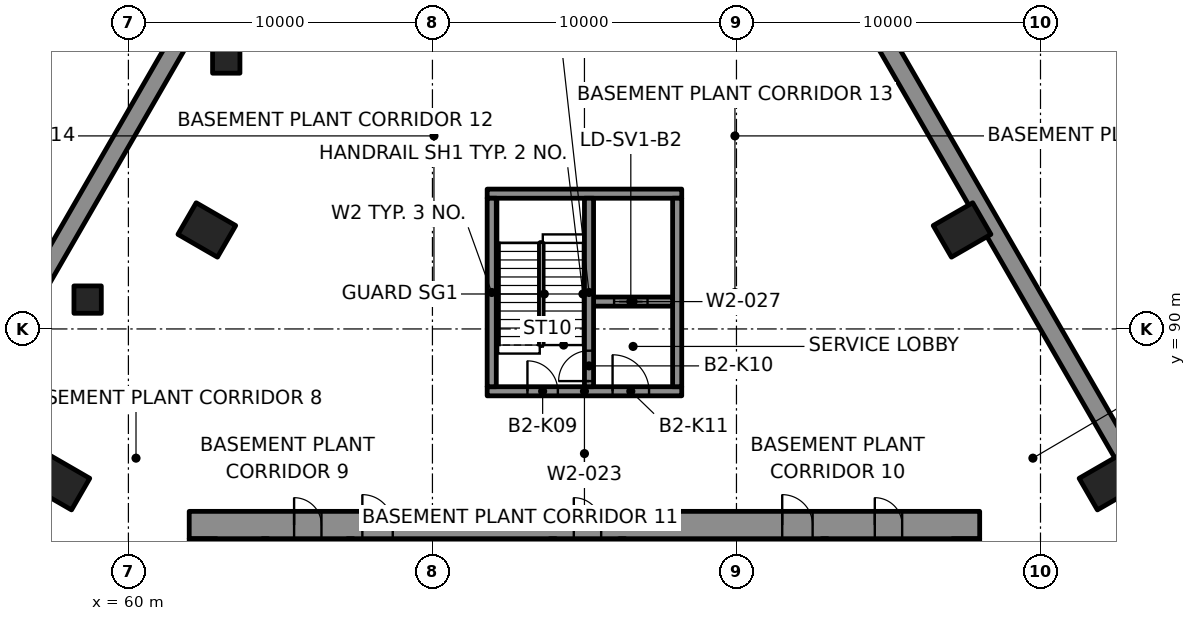
"""IFC4 building model, lengths in metres.
Left out: names, types, materials, properties, quantities, classifications, styles, units other than length and angle.
Written with IfcOpenShell. Run it as: python <this file> out.ifc"""

import sys

from ifc_helpers import new_model, si_unit, direction, frame, frame_2d, origin, origin_2d, place, context, subcontext, project, spatial, rectangle, extrude, element, fill, save


model = new_model("IFC4")
c1 = context("Model", 3, precision=1e-05, world=origin(), true_north=direction((0.0, 1.0)))
c2 = subcontext(c1, "Body", "Model", "MODEL_VIEW")
j1 = project(units=[si_unit("LENGTHUNIT", "METRE"), si_unit("PLANEANGLEUNIT", "RADIAN")], contexts=[c1])
p1 = place(None, origin())
s1 = spatial("IfcSite", under=j1, at=p1, CompositionType="ELEMENT")
p2 = place(p1, origin())
s2 = spatial("IfcBuilding", under=s1, at=p2, CompositionType="ELEMENT")
p3 = place(p2, frame((0.0, 0.0, -9.5)))
s3 = spatial("IfcBuildingStorey", under=s2, at=p3, CompositionType="ELEMENT", Elevation=-9.5)
p4 = place(p3, frame((109.132, 57.451, -0.35), z_axis=(0.0, 0.0, 1.0), x_axis=(-0.499999206999, 0.866025861623, 0.0)))
e1 = element("IfcWall", 1, at=p4, inside=s3, PredefinedType="SOLIDWALL", context=c2, shape_type="SweptSolid", body=[
    extrude(rectangle(XDim=61.064, YDim=0.6, at=frame_2d((30.532, 0.0))), origin(), (0.0, 0.0, 1.0), 4.5),
])
p5 = place(p3, frame((67.936, 110.334, -0.35), z_axis=(0.0, 0.0, 1.0), x_axis=(-0.499999089162, -0.866025929656, 0.0)))
e2 = element("IfcWall", 2, at=p5, inside=s3, PredefinedType="SOLIDWALL", context=c2, shape_type="SweptSolid", body=[
    extrude(rectangle(XDim=53.501, YDim=0.6, at=frame_2d((26.751, 0.0))), origin(), (0.0, 0.0, 1.0), 4.5),
])
for number, where, z_axis, x_axis in (
    (3, (92.22, 84.942, 0.0), (0.0, 0.0, 1.0), (-0.5, 0.866, 0.0)),
    (4, (87.421, 93.256, 0.0), (0.0, 0.0, 1.0), (-0.5, 0.866, 0.0)),
    (5, (62.579, 93.256, 0.0), (0.0, 0.0, 1.0), (-0.5, -0.866, 0.0)),
    (6, (57.78, 84.942, 0.0), (0.0, 0.0, 1.0), (-0.5, -0.866, 0.0)),
):
    element("IfcColumn", number, at=place(p3, frame(where, z_axis=z_axis, x_axis=x_axis)), inside=s3, PredefinedType="COLUMN", context=c2, shape_type="SweptSolid", body=[
        extrude(rectangle(XDim=1.2, YDim=1.5, at=origin_2d()), origin(), (0.0, 0.0, 1.0), 4.5),
    ])
for number, where, z_axis, x_axis in (
    (7, (58.659, 90.966, 0.0), (0.0, 0.0, 1.0), (1.0, 0.0, 0.0)),
    (8, (63.219, 98.863, 0.0), (0.0, 0.0, 1.0), (1.0, 0.0, 0.0)),
):
    element("IfcColumn", number, at=place(p3, frame(where, z_axis=z_axis, x_axis=x_axis)), inside=s3, PredefinedType="COLUMN", context=c2, shape_type="SweptSolid", body=[
        extrude(rectangle(XDim=0.9, YDim=0.9, at=origin_2d()), origin(), (0.0, 0.0, 1.0), 4.5),
    ])
p6 = place(p3, frame((62.0, 83.55, 0.0), z_axis=(0.0, 0.0, 1.0), x_axis=(1.0, 0.0, 0.0)))
e9 = element("IfcWall", 9, at=p6, inside=s3, PredefinedType="SHEAR", context=c2, shape_type="SweptSolid", body=[
    extrude(rectangle(XDim=26.0, YDim=0.9, at=frame_2d((13.0, 0.0))), origin(), (0.0, 0.0, 1.0), 4.15),
])
p7 = place(p6, frame((5.695, 0.0, 0.0)))
e10 = element("IfcOpeningElement", 10, at=p7, cuts=e9, PredefinedType="OPENING", context=c2, shape_type="SweptSolid", body=[
    extrude(rectangle(XDim=1.0, YDim=2.1, at=frame_2d((0.5, 1.05))), frame((0.0, 0.46, 0.0), z_axis=(0.0, -1.0, 0.0), x_axis=(1.0, 0.0, 0.0)), (0.0, 0.0, 1.0), 0.92),
])
p8 = place(p6, frame((19.505, 0.0, 0.0)))
e11 = element("IfcOpeningElement", 11, at=p8, cuts=e9, PredefinedType="OPENING", context=c2, shape_type="SweptSolid", body=[
    extrude(rectangle(XDim=1.0, YDim=2.1, at=frame_2d((0.5, 1.05))), frame((0.0, 0.46, 0.0), z_axis=(0.0, -1.0, 0.0), x_axis=(1.0, 0.0, 0.0)), (0.0, 0.0, 1.0), 0.92),
])
p9 = place(p6, frame((3.45, 0.0, 0.0)))
e12 = element("IfcOpeningElement", 12, at=p9, cuts=e9, PredefinedType="OPENING", context=c2, shape_type="SweptSolid", body=[
    extrude(rectangle(XDim=0.9, YDim=2.1, at=frame_2d((0.45, 1.05))), frame((0.0, 0.46, 0.0), z_axis=(0.0, -1.0, 0.0), x_axis=(1.0, 0.0, 0.0)), (0.0, 0.0, 1.0), 0.92),
])
p10 = place(p6, frame((12.65, 0.0, 0.0)))
e13 = element("IfcOpeningElement", 13, at=p10, cuts=e9, PredefinedType="OPENING", context=c2, shape_type="SweptSolid", body=[
    extrude(rectangle(XDim=0.9, YDim=2.1, at=frame_2d((0.45, 1.05))), frame((0.0, 0.46, 0.0), z_axis=(0.0, -1.0, 0.0), x_axis=(1.0, 0.0, 0.0)), (0.0, 0.0, 1.0), 0.92),
])
p11 = place(p6, frame((22.55, 0.0, 0.0)))
e14 = element("IfcOpeningElement", 14, at=p11, cuts=e9, PredefinedType="OPENING", context=c2, shape_type="SweptSolid", body=[
    extrude(rectangle(XDim=0.9, YDim=2.1, at=frame_2d((0.45, 1.05))), frame((0.0, 0.46, 0.0), z_axis=(0.0, -1.0, 0.0), x_axis=(1.0, 0.0, 0.0)), (0.0, 0.0, 1.0), 0.92),
])
p12 = place(p3, frame((62.45, 66.9, 0.0), z_axis=(0.0, 0.0, 1.0), x_axis=(0.0, 1.0, 0.0)))
e15 = element("IfcWall", 15, at=p12, inside=s3, PredefinedType="SHEAR", context=c2, shape_type="SweptSolid", body=[
    extrude(rectangle(XDim=16.2, YDim=0.9, at=frame_2d((8.1, 0.0))), origin(), (0.0, 0.0, 1.0), 4.15),
])
p13 = place(p12, frame((5.5, 0.0, 0.0)))
e16 = element("IfcOpeningElement", 16, at=p13, cuts=e15, PredefinedType="OPENING", context=c2, shape_type="SweptSolid", body=[
    extrude(rectangle(XDim=1.8, YDim=2.1, at=frame_2d((0.9, 1.05))), frame((0.0, 0.46, 0.0), z_axis=(0.0, -1.0, 0.0), x_axis=(1.0, 0.0, 0.0)), (0.0, 0.0, 1.0), 0.92),
])
p14 = place(p3, frame((87.55, 66.9, 0.0), z_axis=(0.0, 0.0, 1.0), x_axis=(0.0, 1.0, 0.0)))
e17 = element("IfcWall", 17, at=p14, inside=s3, PredefinedType="SHEAR", context=c2, shape_type="SweptSolid", body=[
    extrude(rectangle(XDim=16.2, YDim=0.9, at=frame_2d((8.1, 0.0))), origin(), (0.0, 0.0, 1.0), 4.15),
])
p15 = place(p14, frame((5.5, 0.0, 0.0)))
e18 = element("IfcOpeningElement", 18, at=p15, cuts=e17, PredefinedType="OPENING", context=c2, shape_type="SweptSolid", body=[
    extrude(rectangle(XDim=1.8, YDim=2.1, at=frame_2d((0.9, 1.05))), frame((0.0, 0.46, 0.0), z_axis=(0.0, -1.0, 0.0), x_axis=(1.0, 0.0, 0.0)), (0.0, 0.0, 1.0), 0.92),
])
p16 = place(p14, frame((11.202, 0.0, 0.0)))
e19 = element("IfcOpeningElement", 19, at=p16, cuts=e17, PredefinedType="OPENING", context=c2, shape_type="SweptSolid", body=[
    extrude(rectangle(XDim=0.9, YDim=2.1, at=frame_2d((0.45, 1.05))), frame((0.0, 0.46, 0.0), z_axis=(0.0, -1.0, 0.0), x_axis=(1.0, 0.0, 0.0)), (0.0, 0.0, 1.0), 0.92),
])
p17 = place(p3, frame((71.8, 87.95, 0.0), z_axis=(0.0, 0.0, 1.0), x_axis=(1.0, 0.0, 0.0)))
e20 = element("IfcWall", 20, at=p17, inside=s3, PredefinedType="SHEAR", context=c2, shape_type="SweptSolid", body=[
    extrude(rectangle(XDim=6.4, YDim=0.3, at=frame_2d((3.2, 0.0))), origin(), (0.0, 0.0, 1.0), 4.15),
])
p18 = place(p17, frame((1.325, 0.0, 0.0)))
e21 = element("IfcOpeningElement", 21, at=p18, cuts=e20, PredefinedType="OPENING", context=c2, shape_type="SweptSolid", body=[
    extrude(rectangle(XDim=1.0, YDim=2.1, at=frame_2d((0.5, 1.05))), frame((0.0, 0.16, 0.0), z_axis=(0.0, -1.0, 0.0), x_axis=(1.0, 0.0, 0.0)), (0.0, 0.0, 1.0), 0.32),
])
p19 = place(p17, frame((4.125, 0.0, 0.0)))
e22 = element("IfcOpeningElement", 22, at=p19, cuts=e20, PredefinedType="OPENING", context=c2, shape_type="SweptSolid", body=[
    extrude(rectangle(XDim=1.2, YDim=2.1, at=frame_2d((0.6, 1.05))), frame((0.0, 0.16, 0.0), z_axis=(0.0, -1.0, 0.0), x_axis=(1.0, 0.0, 0.0)), (0.0, 0.0, 1.0), 0.32),
])
p20 = place(p3, frame((71.8, 94.45, 0.0), z_axis=(0.0, 0.0, 1.0), x_axis=(1.0, 0.0, 0.0)))
e23 = element("IfcWall", 23, at=p20, inside=s3, PredefinedType="SHEAR", context=c2, shape_type="SweptSolid", body=[
    extrude(rectangle(XDim=6.4, YDim=0.3, at=frame_2d((3.2, 0.0))), origin(), (0.0, 0.0, 1.0), 4.15),
])
for number, where, z_axis, x_axis in (
    (24, (71.95, 88.1, 0.0), (0.0, 0.0, 1.0), (0.0, 1.0, 0.0)),
    (25, (78.05, 88.1, 0.0), (0.0, 0.0, 1.0), (0.0, 1.0, 0.0)),
):
    element("IfcWall", number, at=place(p3, frame(where, z_axis=z_axis, x_axis=x_axis)), inside=s3, PredefinedType="SHEAR", context=c2, shape_type="SweptSolid", body=[
        extrude(rectangle(XDim=6.2, YDim=0.3, at=frame_2d((3.1, 0.0))), origin(), (0.0, 0.0, 1.0), 4.15),
    ])
p21 = place(p3, frame((75.3, 90.9, 0.0), z_axis=(0.0, 0.0, 1.0), x_axis=(1.0, 0.0, 0.0)))
e26 = element("IfcWall", 26, at=p21, inside=s3, PredefinedType="SHEAR", context=c2, shape_type="SweptSolid", body=[
    extrude(rectangle(XDim=2.6, YDim=0.3, at=frame_2d((1.3, 0.0))), origin(), (0.0, 0.0, 1.0), 4.15),
])
p22 = place(p21, frame((0.675, 0.0, 0.0)))
e27 = element("IfcOpeningElement", 27, at=p22, cuts=e26, PredefinedType="OPENING", context=c2, shape_type="SweptSolid", body=[
    extrude(rectangle(XDim=1.1, YDim=2.1, at=frame_2d((0.55, 1.05))), frame((0.0, 0.16, 0.0), z_axis=(0.0, -1.0, 0.0), x_axis=(1.0, 0.0, 0.0)), (0.0, 0.0, 1.0), 0.32),
])
p23 = place(p3, frame((75.15, 88.1, 0.0), z_axis=(0.0, 0.0, 1.0), x_axis=(0.0, 1.0, 0.0)))
e28 = element("IfcWall", 28, at=p23, inside=s3, PredefinedType="SHEAR", context=c2, shape_type="SweptSolid", body=[
    extrude(rectangle(XDim=6.2, YDim=0.3, at=frame_2d((3.1, 0.0))), origin(), (0.0, 0.0, 1.0), 4.15),
])
p24 = place(p23, frame((0.185, 0.0, 0.0)))
e29 = element("IfcOpeningElement", 29, at=p24, cuts=e28, PredefinedType="OPENING", context=c2, shape_type="SweptSolid", body=[
    extrude(rectangle(XDim=1.0, YDim=2.1, at=frame_2d((0.5, 1.05))), frame((0.0, 0.16, 0.0), z_axis=(0.0, -1.0, 0.0), x_axis=(1.0, 0.0, 0.0)), (0.0, 0.0, 1.0), 0.32),
])
p25 = place(p3, frame((64.5, 74.95, 0.0), z_axis=(0.0, 0.0, 1.0), x_axis=(0.0, 1.0, 0.0)))
e30 = element("IfcWall", 30, at=p25, inside=s3, PredefinedType="PARTITIONING", context=c2, shape_type="SweptSolid", body=[
    extrude(rectangle(XDim=8.15, YDim=0.2, at=frame_2d((4.075, 0.0))), origin(), (0.0, 0.0, 1.0), 4.15),
])
for number, where, z_axis, x_axis in (
    (31, (67.3, 81.28, 0.0), (0.0, 0.0, 1.0), (0.0, 1.0, 0.0)),
    (32, (73.96, 81.28, 0.0), (0.0, 0.0, 1.0), (0.0, 1.0, 0.0)),
    (33, (76.24, 81.28, 0.0), (0.0, 0.0, 1.0), (0.0, 1.0, 0.0)),
    (34, (82.9, 81.28, 0.0), (0.0, 0.0, 1.0), (0.0, 1.0, 0.0)),
):
    element("IfcWall", number, at=place(p3, frame(where, z_axis=z_axis, x_axis=x_axis)), inside=s3, PredefinedType="PARTITIONING", context=c2, shape_type="SweptSolid", body=[
        extrude(rectangle(XDim=1.82, YDim=0.2, at=frame_2d((0.91, 0.0))), origin(), (0.0, 0.0, 1.0), 4.15),
    ])
p26 = place(p22, origin())
e35 = element("IfcDoor", 35, at=p26, inside=s3, OperationType="DOUBLE_DOOR_SLIDING", PredefinedType="DOOR", context=c2, shape_type="SweptSolid", body=[
    extrude(rectangle(XDim=1.1, YDim=2.1, at=frame_2d((0.55, 1.05))), frame((0.0, 0.025, 0.0), z_axis=(0.0, -1.0, 0.0), x_axis=(1.0, 0.0, 0.0)), (0.0, 0.0, 1.0), 0.05),
])
fill(e27, e35)
p27 = place(p7, origin())
e36 = element("IfcDoor", 36, at=p27, inside=s3, OperationType="SINGLE_SWING_LEFT", PredefinedType="DOOR", context=c2, shape_type="SweptSolid", body=[
    extrude(rectangle(XDim=1.0, YDim=2.1, at=frame_2d((0.5, 1.05))), frame((0.0, 0.17, 0.0), z_axis=(0.0, -1.0, 0.0), x_axis=(1.0, 0.0, 0.0)), (0.0, 0.0, 1.0), 0.34),
])
fill(e10, e36)
p28 = place(p8, origin())
e37 = element("IfcDoor", 37, at=p28, inside=s3, OperationType="SINGLE_SWING_LEFT", PredefinedType="DOOR", context=c2, shape_type="SweptSolid", body=[
    extrude(rectangle(XDim=1.0, YDim=2.1, at=frame_2d((0.5, 1.05))), frame((0.0, 0.17, 0.0), z_axis=(0.0, -1.0, 0.0), x_axis=(1.0, 0.0, 0.0)), (0.0, 0.0, 1.0), 0.34),
])
fill(e11, e37)
p29 = place(p18, origin())
e38 = element("IfcDoor", 38, at=p29, inside=s3, OperationType="SINGLE_SWING_RIGHT", PredefinedType="DOOR", context=c2, shape_type="SweptSolid", body=[
    extrude(rectangle(XDim=1.0, YDim=2.1, at=frame_2d((0.5, 1.05))), frame((0.0, 0.025, 0.0), z_axis=(0.0, -1.0, 0.0), x_axis=(1.0, 0.0, 0.0)), (0.0, 0.0, 1.0), 0.05),
])
fill(e21, e38)
p30 = place(p24, origin())
e39 = element("IfcDoor", 39, at=p30, inside=s3, OperationType="SINGLE_SWING_LEFT", PredefinedType="DOOR", context=c2, shape_type="SweptSolid", body=[
    extrude(rectangle(XDim=1.0, YDim=2.1, at=frame_2d((0.5, 1.05))), frame((0.0, 0.025, 0.0), z_axis=(0.0, -1.0, 0.0), x_axis=(1.0, 0.0, 0.0)), (0.0, 0.0, 1.0), 0.05),
])
fill(e29, e39)
p31 = place(p19, origin())
e40 = element("IfcDoor", 40, at=p31, inside=s3, OperationType="SINGLE_SWING_RIGHT", PredefinedType="DOOR", context=c2, shape_type="SweptSolid", body=[
    extrude(rectangle(XDim=1.2, YDim=2.1, at=frame_2d((0.6, 1.05))), frame((0.0, 0.025, 0.0), z_axis=(0.0, -1.0, 0.0), x_axis=(1.0, 0.0, 0.0)), (0.0, 0.0, 1.0), 0.05),
])
fill(e22, e40)
p32 = place(p9, origin())
e41 = element("IfcDoor", 41, at=p32, inside=s3, OperationType="SINGLE_SWING_RIGHT", PredefinedType="DOOR", context=c2, shape_type="SweptSolid", body=[
    extrude(rectangle(XDim=0.9, YDim=2.1, at=frame_2d((0.45, 1.05))), frame((0.0, 0.17, 0.0), z_axis=(0.0, -1.0, 0.0), x_axis=(1.0, 0.0, 0.0)), (0.0, 0.0, 1.0), 0.34),
])
fill(e12, e41)
p33 = place(p10, origin())
e42 = element("IfcDoor", 42, at=p33, inside=s3, OperationType="SINGLE_SWING_RIGHT", PredefinedType="DOOR", context=c2, shape_type="SweptSolid", body=[
    extrude(rectangle(XDim=0.9, YDim=2.1, at=frame_2d((0.45, 1.05))), frame((0.0, 0.17, 0.0), z_axis=(0.0, -1.0, 0.0), x_axis=(1.0, 0.0, 0.0)), (0.0, 0.0, 1.0), 0.34),
])
fill(e13, e42)
p34 = place(p11, origin())
e43 = element("IfcDoor", 43, at=p34, inside=s3, OperationType="SINGLE_SWING_RIGHT", PredefinedType="DOOR", context=c2, shape_type="SweptSolid", body=[
    extrude(rectangle(XDim=0.9, YDim=2.1, at=frame_2d((0.45, 1.05))), frame((0.0, 0.17, 0.0), z_axis=(0.0, -1.0, 0.0), x_axis=(1.0, 0.0, 0.0)), (0.0, 0.0, 1.0), 0.34),
])
fill(e14, e43)
save(model, sys.argv[1])
